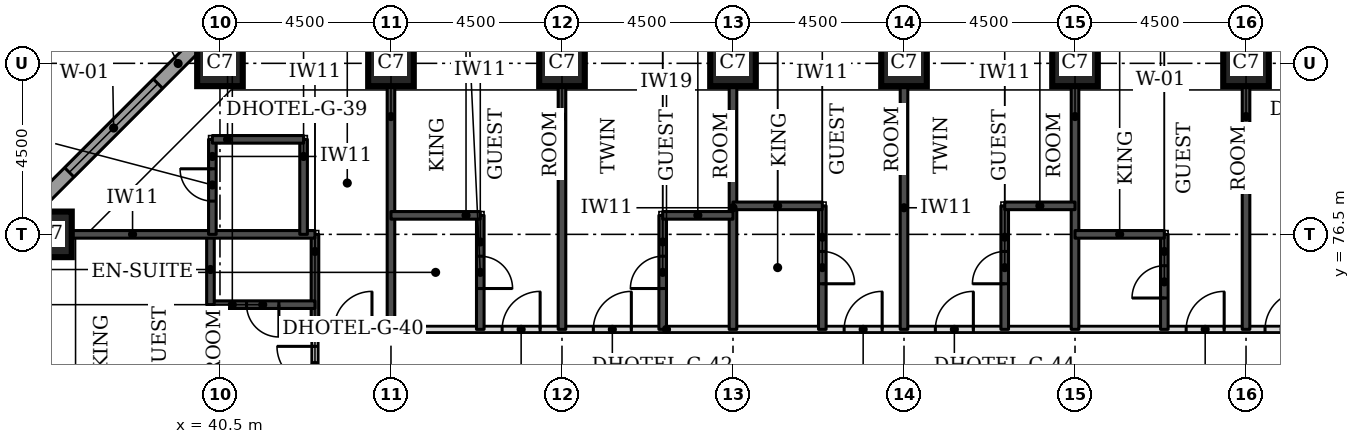
"""IFC4 building model, lengths in metres.
Left out: names, types, materials, properties, quantities, classifications, styles, units other than length and angle.
Written with IfcOpenShell. Run it as: python <this file> out.ifc"""

import sys

from ifc_helpers import new_model, si_unit, direction, frame, frame_2d, origin, origin_2d, place, context, subcontext, project, spatial, rectangle, extrude, element, fill, save


model = new_model("IFC4")
c1 = context("Model", 3, precision=1e-05, world=origin(), true_north=direction((0.0, 1.0)))
c2 = subcontext(c1, "Body", "Model", "MODEL_VIEW")
j1 = project(units=[si_unit("LENGTHUNIT", "METRE"), si_unit("PLANEANGLEUNIT", "RADIAN")], contexts=[c1])
p1 = place(None, origin())
s1 = spatial("IfcSite", under=j1, at=p1, CompositionType="ELEMENT")
p2 = place(p1, origin())
s2 = spatial("IfcBuilding", under=s1, at=p2, CompositionType="ELEMENT")
p3 = place(p2, frame((0.0, 0.0, 66.0)))
s3 = spatial("IfcBuildingStorey", under=s2, at=p3, CompositionType="ELEMENT", Elevation=66.0)
for number, where, z_axis, x_axis in (
    (1, (36.0, 76.5, 0.0), (0.0, 0.0, 1.0), (1.0, 0.0, 0.0)),
    (2, (40.5, 81.0, 0.0), (0.0, 0.0, 1.0), (1.0, 0.0, 0.0)),
    (3, (45.0, 81.0, 0.0), (0.0, 0.0, 1.0), (1.0, 0.0, 0.0)),
    (4, (49.5, 81.0, 0.0), (0.0, 0.0, 1.0), (1.0, 0.0, 0.0)),
    (5, (54.0, 81.0, 0.0), (0.0, 0.0, 1.0), (1.0, 0.0, 0.0)),
    (6, (58.5, 81.0, 0.0), (0.0, 0.0, 1.0), (1.0, 0.0, 0.0)),
    (7, (63.0, 81.0, 0.0), (0.0, 0.0, 1.0), (1.0, 0.0, 0.0)),
    (8, (67.5, 81.0, 0.0), (0.0, 0.0, 1.0), (1.0, 0.0, 0.0)),
):
    element("IfcColumn", number, at=place(p3, frame(where, z_axis=z_axis, x_axis=x_axis)), inside=s3, PredefinedType="COLUMN", context=c2, shape_type="SweptSolid", body=[
        extrude(rectangle(XDim=1.2, YDim=1.2, at=origin_2d()), origin(), (0.0, 0.0, 1.0), 3.3),
    ])
p4 = place(p3, frame((40.23, 81.826, 0.0), z_axis=(0.0, 0.0, 1.0), x_axis=(-0.707106781187, -0.707106781187, 0.0)))
e9 = element("IfcWall", 9, at=p4, inside=s3, PredefinedType="STANDARD", context=c2, shape_type="SweptSolid", body=[
    extrude(rectangle(XDim=7.151, YDim=0.35, at=frame_2d((3.576, 0.0))), origin(), (0.0, 0.0, 1.0), 3.055),
])
p5 = place(p4, frame((1.926, 0.0, 0.8)))
e10 = element("IfcOpeningElement", 10, at=p5, cuts=e9, PredefinedType="OPENING", context=c2, shape_type="SweptSolid", body=[
    extrude(rectangle(XDim=3.3, YDim=1.5, at=frame_2d((1.65, 0.75))), frame((0.0, 0.185, 0.0), z_axis=(0.0, -1.0, 0.0), x_axis=(1.0, 0.0, 0.0)), (0.0, 0.0, 1.0), 0.37),
])
p6 = place(p3, frame((43.0, 56.6, 0.0), z_axis=(0.0, 0.0, 1.0), x_axis=(0.0, 1.0, 0.0)))
e11 = element("IfcWall", 11, at=p6, inside=s3, PredefinedType="PARTITIONING", context=c2, shape_type="SweptSolid", body=[
    extrude(rectangle(XDim=17.4, YDim=0.15, at=frame_2d((8.7, 0.0))), origin(), (0.0, 0.0, 1.0), 3.08),
])
p7 = place(p6, frame((9.075, 0.0, 0.0)))
e12 = element("IfcOpeningElement", 12, at=p7, cuts=e11, PredefinedType="OPENING", context=c2, shape_type="SweptSolid", body=[
    extrude(rectangle(XDim=1.0, YDim=2.1, at=frame_2d((0.5, 1.05))), frame((0.0, 0.085, 0.0), z_axis=(0.0, -1.0, 0.0), x_axis=(1.0, 0.0, 0.0)), (0.0, 0.0, 1.0), 0.17),
])
p8 = place(p6, frame((11.475, 0.0, 0.0)))
e13 = element("IfcOpeningElement", 13, at=p8, cuts=e11, PredefinedType="OPENING", context=c2, shape_type="SweptSolid", body=[
    extrude(rectangle(XDim=1.0, YDim=2.1, at=frame_2d((0.5, 1.05))), frame((0.0, 0.085, 0.0), z_axis=(0.0, -1.0, 0.0), x_axis=(1.0, 0.0, 0.0)), (0.0, 0.0, 1.0), 0.17),
])
p9 = place(p6, frame((15.953, 0.0, 0.0)))
e14 = element("IfcOpeningElement", 14, at=p9, cuts=e11, PredefinedType="OPENING", context=c2, shape_type="SweptSolid", body=[
    extrude(rectangle(XDim=1.0, YDim=2.1, at=frame_2d((0.5, 1.05))), frame((0.0, 0.085, 0.0), z_axis=(0.0, -1.0, 0.0), x_axis=(1.0, 0.0, 0.0)), (0.0, 0.0, 1.0), 0.17),
])
p10 = place(p3, frame((43.0, 74.0, 0.0), z_axis=(0.0, 0.0, 1.0), x_axis=(1.0, 0.0, 0.0)))
e15 = element("IfcWall", 15, at=p10, inside=s3, PredefinedType="PARTITIONING", context=c2, shape_type="SweptSolid", body=[
    extrude(rectangle(XDim=26.5, YDim=0.15, at=frame_2d((13.25, 0.0))), origin(), (0.0, 0.0, 1.0), 3.08),
])
p11 = place(p10, frame((4.925, 0.0, 0.0)))
e16 = element("IfcOpeningElement", 16, at=p11, cuts=e15, PredefinedType="OPENING", context=c2, shape_type="SweptSolid", body=[
    extrude(rectangle(XDim=1.0, YDim=2.1, at=frame_2d((0.5, 1.05))), frame((0.0, 0.085, 0.0), z_axis=(0.0, -1.0, 0.0), x_axis=(1.0, 0.0, 0.0)), (0.0, 0.0, 1.0), 0.17),
])
p12 = place(p10, frame((7.325, 0.0, 0.0)))
e17 = element("IfcOpeningElement", 17, at=p12, cuts=e15, PredefinedType="OPENING", context=c2, shape_type="SweptSolid", body=[
    extrude(rectangle(XDim=1.0, YDim=2.1, at=frame_2d((0.5, 1.05))), frame((0.0, 0.085, 0.0), z_axis=(0.0, -1.0, 0.0), x_axis=(1.0, 0.0, 0.0)), (0.0, 0.0, 1.0), 0.17),
])
p13 = place(p10, frame((13.925, 0.0, 0.0)))
e18 = element("IfcOpeningElement", 18, at=p13, cuts=e15, PredefinedType="OPENING", context=c2, shape_type="SweptSolid", body=[
    extrude(rectangle(XDim=1.0, YDim=2.1, at=frame_2d((0.5, 1.05))), frame((0.0, 0.085, 0.0), z_axis=(0.0, -1.0, 0.0), x_axis=(1.0, 0.0, 0.0)), (0.0, 0.0, 1.0), 0.17),
])
p14 = place(p10, frame((16.325, 0.0, 0.0)))
e19 = element("IfcOpeningElement", 19, at=p14, cuts=e15, PredefinedType="OPENING", context=c2, shape_type="SweptSolid", body=[
    extrude(rectangle(XDim=1.0, YDim=2.1, at=frame_2d((0.5, 1.05))), frame((0.0, 0.085, 0.0), z_axis=(0.0, -1.0, 0.0), x_axis=(1.0, 0.0, 0.0)), (0.0, 0.0, 1.0), 0.17),
])
p15 = place(p10, frame((22.925, 0.0, 0.0)))
e20 = element("IfcOpeningElement", 20, at=p15, cuts=e15, PredefinedType="OPENING", context=c2, shape_type="SweptSolid", body=[
    extrude(rectangle(XDim=1.0, YDim=2.1, at=frame_2d((0.5, 1.05))), frame((0.0, 0.085, 0.0), z_axis=(0.0, -1.0, 0.0), x_axis=(1.0, 0.0, 0.0)), (0.0, 0.0, 1.0), 0.17),
])
p16 = place(p10, frame((0.5, 0.0, 0.0)))
e21 = element("IfcOpeningElement", 21, at=p16, cuts=e15, PredefinedType="OPENING", context=c2, shape_type="SweptSolid", body=[
    extrude(rectangle(XDim=1.0, YDim=2.1, at=frame_2d((0.5, 1.05))), frame((0.0, 0.085, 0.0), z_axis=(0.0, -1.0, 0.0), x_axis=(1.0, 0.0, 0.0)), (0.0, 0.0, 1.0), 0.17),
])
p17 = place(p10, frame((25.0, 0.0, 0.0)))
e22 = element("IfcOpeningElement", 22, at=p17, cuts=e15, PredefinedType="OPENING", context=c2, shape_type="SweptSolid", body=[
    extrude(rectangle(XDim=1.0, YDim=2.1, at=frame_2d((0.5, 1.05))), frame((0.0, 0.085, 0.0), z_axis=(0.0, -1.0, 0.0), x_axis=(1.0, 0.0, 0.0)), (0.0, 0.0, 1.0), 0.17),
])
p18 = place(p3, frame((43.0, 74.0, 0.0), z_axis=(0.0, 0.0, 1.0), x_axis=(0.0, 1.0, 0.0)))
e23 = element("IfcWall", 23, at=p18, inside=s3, PredefinedType="SOLIDWALL", context=c2, shape_type="SweptSolid", body=[
    extrude(rectangle(XDim=2.5, YDim=0.2, at=frame_2d((1.25, 0.0))), origin(), (0.0, 0.0, 1.0), 3.08),
])
p19 = place(p3, frame((45.0, 74.0, 0.0), z_axis=(0.0, 0.0, 1.0), x_axis=(0.0, 1.0, 0.0)))
e24 = element("IfcWall", 24, at=p19, inside=s3, PredefinedType="SOLIDWALL", context=c2, shape_type="SweptSolid", body=[
    extrude(rectangle(XDim=6.4, YDim=0.2, at=frame_2d((3.2, 0.0))), origin(), (0.0, 0.0, 1.0), 3.08),
])
p20 = place(p3, frame((47.35, 74.0, 0.0), z_axis=(0.0, 0.0, 1.0), x_axis=(0.0, 1.0, 0.0)))
e25 = element("IfcWall", 25, at=p20, inside=s3, PredefinedType="SOLIDWALL", context=c2, shape_type="SweptSolid", body=[
    extrude(rectangle(XDim=3.0, YDim=0.2, at=frame_2d((1.5, 0.0))), origin(), (0.0, 0.0, 1.0), 3.08),
])
p21 = place(p20, frame((1.075, 0.0, 0.0)))
e26 = element("IfcOpeningElement", 26, at=p21, cuts=e25, PredefinedType="OPENING", context=c2, shape_type="SweptSolid", body=[
    extrude(rectangle(XDim=0.85, YDim=2.1, at=frame_2d((0.425, 1.05))), frame((0.0, 0.11, 0.0), z_axis=(0.0, -1.0, 0.0), x_axis=(1.0, 0.0, 0.0)), (0.0, 0.0, 1.0), 0.22),
])
p22 = place(p3, frame((49.5, 74.0, 0.0), z_axis=(0.0, 0.0, 1.0), x_axis=(0.0, 1.0, 0.0)))
e27 = element("IfcWall", 27, at=p22, inside=s3, PredefinedType="SOLIDWALL", context=c2, shape_type="SweptSolid", body=[
    extrude(rectangle(XDim=6.4, YDim=0.2, at=frame_2d((3.2, 0.0))), origin(), (0.0, 0.0, 1.0), 3.08),
])
p23 = place(p3, frame((52.15, 74.0, 0.0), z_axis=(0.0, 0.0, 1.0), x_axis=(0.0, 1.0, 0.0)))
e28 = element("IfcWall", 28, at=p23, inside=s3, PredefinedType="SOLIDWALL", context=c2, shape_type="SweptSolid", body=[
    extrude(rectangle(XDim=3.0, YDim=0.2, at=frame_2d((1.5, 0.0))), origin(), (0.0, 0.0, 1.0), 3.08),
])
p24 = place(p23, frame((1.075, 0.0, 0.0)))
e29 = element("IfcOpeningElement", 29, at=p24, cuts=e28, PredefinedType="OPENING", context=c2, shape_type="SweptSolid", body=[
    extrude(rectangle(XDim=0.85, YDim=2.1, at=frame_2d((0.425, 1.05))), frame((0.0, 0.11, 0.0), z_axis=(0.0, -1.0, 0.0), x_axis=(1.0, 0.0, 0.0)), (0.0, 0.0, 1.0), 0.22),
])
p25 = place(p3, frame((54.0, 74.0, 0.0), z_axis=(0.0, 0.0, 1.0), x_axis=(0.0, 1.0, 0.0)))
e30 = element("IfcWall", 30, at=p25, inside=s3, PredefinedType="SOLIDWALL", context=c2, shape_type="SweptSolid", body=[
    extrude(rectangle(XDim=6.4, YDim=0.2, at=frame_2d((3.2, 0.0))), origin(), (0.0, 0.0, 1.0), 3.08),
])
p26 = place(p3, frame((56.35, 74.0, 0.0), z_axis=(0.0, 0.0, 1.0), x_axis=(0.0, 1.0, 0.0)))
e31 = element("IfcWall", 31, at=p26, inside=s3, PredefinedType="SOLIDWALL", context=c2, shape_type="SweptSolid", body=[
    extrude(rectangle(XDim=3.25, YDim=0.2, at=frame_2d((1.625, 0.0))), origin(), (0.0, 0.0, 1.0), 3.08),
])
p27 = place(p26, frame((1.2, 0.0, 0.0)))
e32 = element("IfcOpeningElement", 32, at=p27, cuts=e31, PredefinedType="OPENING", context=c2, shape_type="SweptSolid", body=[
    extrude(rectangle(XDim=0.85, YDim=2.1, at=frame_2d((0.425, 1.05))), frame((0.0, 0.11, 0.0), z_axis=(0.0, -1.0, 0.0), x_axis=(1.0, 0.0, 0.0)), (0.0, 0.0, 1.0), 0.22),
])
p28 = place(p3, frame((58.5, 74.0, 0.0), z_axis=(0.0, 0.0, 1.0), x_axis=(0.0, 1.0, 0.0)))
e33 = element("IfcWall", 33, at=p28, inside=s3, PredefinedType="SOLIDWALL", context=c2, shape_type="SweptSolid", body=[
    extrude(rectangle(XDim=6.4, YDim=0.2, at=frame_2d((3.2, 0.0))), origin(), (0.0, 0.0, 1.0), 3.08),
])
p29 = place(p3, frame((61.15, 74.0, 0.0), z_axis=(0.0, 0.0, 1.0), x_axis=(0.0, 1.0, 0.0)))
e34 = element("IfcWall", 34, at=p29, inside=s3, PredefinedType="SOLIDWALL", context=c2, shape_type="SweptSolid", body=[
    extrude(rectangle(XDim=3.25, YDim=0.2, at=frame_2d((1.625, 0.0))), origin(), (0.0, 0.0, 1.0), 3.08),
])
p30 = place(p29, frame((1.2, 0.0, 0.0)))
e35 = element("IfcOpeningElement", 35, at=p30, cuts=e34, PredefinedType="OPENING", context=c2, shape_type="SweptSolid", body=[
    extrude(rectangle(XDim=0.85, YDim=2.1, at=frame_2d((0.425, 1.05))), frame((0.0, 0.11, 0.0), z_axis=(0.0, -1.0, 0.0), x_axis=(1.0, 0.0, 0.0)), (0.0, 0.0, 1.0), 0.22),
])
p31 = place(p3, frame((63.0, 74.0, 0.0), z_axis=(0.0, 0.0, 1.0), x_axis=(0.0, 1.0, 0.0)))
e36 = element("IfcWall", 36, at=p31, inside=s3, PredefinedType="SOLIDWALL", context=c2, shape_type="SweptSolid", body=[
    extrude(rectangle(XDim=6.4, YDim=0.2, at=frame_2d((3.2, 0.0))), origin(), (0.0, 0.0, 1.0), 3.08),
])
p32 = place(p3, frame((65.35, 74.0, 0.0), z_axis=(0.0, 0.0, 1.0), x_axis=(0.0, 1.0, 0.0)))
e37 = element("IfcWall", 37, at=p32, inside=s3, PredefinedType="SOLIDWALL", context=c2, shape_type="SweptSolid", body=[
    extrude(rectangle(XDim=2.5, YDim=0.2, at=frame_2d((1.25, 0.0))), origin(), (0.0, 0.0, 1.0), 3.08),
])
p33 = place(p32, frame((0.825, 0.0, 0.0)))
e38 = element("IfcOpeningElement", 38, at=p33, cuts=e37, PredefinedType="OPENING", context=c2, shape_type="SweptSolid", body=[
    extrude(rectangle(XDim=0.85, YDim=2.1, at=frame_2d((0.425, 1.05))), frame((0.0, 0.11, 0.0), z_axis=(0.0, -1.0, 0.0), x_axis=(1.0, 0.0, 0.0)), (0.0, 0.0, 1.0), 0.22),
])
p34 = place(p3, frame((67.5, 74.0, 0.0), z_axis=(0.0, 0.0, 1.0), x_axis=(0.0, 1.0, 0.0)))
e39 = element("IfcWall", 39, at=p34, inside=s3, PredefinedType="SOLIDWALL", context=c2, shape_type="SweptSolid", body=[
    extrude(rectangle(XDim=6.4, YDim=0.2, at=frame_2d((3.2, 0.0))), origin(), (0.0, 0.0, 1.0), 3.08),
])
p35 = place(p3, frame((40.25, 74.65, 0.0), z_axis=(0.0, 0.0, 1.0), x_axis=(1.0, 0.0, 0.0)))
e40 = element("IfcWall", 40, at=p35, inside=s3, PredefinedType="SOLIDWALL", context=c2, shape_type="SweptSolid", body=[
    extrude(rectangle(XDim=2.75, YDim=0.2, at=frame_2d((1.375, 0.0))), origin(), (0.0, 0.0, 1.0), 3.08),
])
p36 = place(p35, frame((0.95, 0.0, 0.0)))
e41 = element("IfcOpeningElement", 41, at=p36, cuts=e40, PredefinedType="OPENING", context=c2, shape_type="SweptSolid", body=[
    extrude(rectangle(XDim=0.85, YDim=2.1, at=frame_2d((0.425, 1.05))), frame((0.0, 0.11, 0.0), z_axis=(0.0, -1.0, 0.0), x_axis=(1.0, 0.0, 0.0)), (0.0, 0.0, 1.0), 0.22),
])
p37 = place(p3, frame((40.25, 74.65, 0.0), z_axis=(0.0, 0.0, 1.0), x_axis=(0.0, 1.0, 0.0)))
e42 = element("IfcWall", 42, at=p37, inside=s3, PredefinedType="SOLIDWALL", context=c2, shape_type="SweptSolid", body=[
    extrude(rectangle(XDim=1.85, YDim=0.2, at=frame_2d((0.925, 0.0))), origin(), (0.0, 0.0, 1.0), 3.08),
])
p38 = place(p3, frame((36.6, 76.5, 0.0), z_axis=(0.0, 0.0, 1.0), x_axis=(1.0, 0.0, 0.0)))
e43 = element("IfcWall", 43, at=p38, inside=s3, PredefinedType="SOLIDWALL", context=c2, shape_type="SweptSolid", body=[
    extrude(rectangle(XDim=6.4, YDim=0.2, at=frame_2d((3.2, 0.0))), origin(), (0.0, 0.0, 1.0), 3.08),
])
p39 = place(p3, frame((40.3, 76.5, 0.0), z_axis=(0.0, 0.0, 1.0), x_axis=(0.0, 1.0, 0.0)))
e44 = element("IfcWall", 44, at=p39, inside=s3, PredefinedType="SOLIDWALL", context=c2, shape_type="SweptSolid", body=[
    extrude(rectangle(XDim=2.5, YDim=0.2, at=frame_2d((1.25, 0.0))), origin(), (0.0, 0.0, 1.0), 3.08),
])
p40 = place(p39, frame((0.875, 0.0, 0.0)))
e45 = element("IfcOpeningElement", 45, at=p40, cuts=e44, PredefinedType="OPENING", context=c2, shape_type="SweptSolid", body=[
    extrude(rectangle(XDim=0.85, YDim=2.1, at=frame_2d((0.425, 1.05))), frame((0.0, 0.11, 0.0), z_axis=(0.0, -1.0, 0.0), x_axis=(1.0, 0.0, 0.0)), (0.0, 0.0, 1.0), 0.22),
])
p41 = place(p3, frame((42.7, 76.5, 0.0), z_axis=(0.0, 0.0, 1.0), x_axis=(0.0, 1.0, 0.0)))
e46 = element("IfcWall", 46, at=p41, inside=s3, PredefinedType="SOLIDWALL", context=c2, shape_type="SweptSolid", body=[
    extrude(rectangle(XDim=2.5, YDim=0.2, at=frame_2d((1.25, 0.0))), origin(), (0.0, 0.0, 1.0), 3.08),
])
for number, where, z_axis, x_axis in (
    (47, (63.0, 76.5, 0.0), (0.0, 0.0, 1.0), (1.0, 0.0, 0.0)),
    (48, (45.0, 77.0, 0.0), (0.0, 0.0, 1.0), (1.0, 0.0, 0.0)),
):
    element("IfcWall", number, at=place(p3, frame(where, z_axis=z_axis, x_axis=x_axis)), inside=s3, PredefinedType="SOLIDWALL", context=c2, shape_type="SweptSolid", body=[
        extrude(rectangle(XDim=2.35, YDim=0.2, at=frame_2d((1.175, 0.0))), origin(), (0.0, 0.0, 1.0), 3.08),
    ])
p42 = place(p3, frame((52.15, 77.0, 0.0), z_axis=(0.0, 0.0, 1.0), x_axis=(1.0, 0.0, 0.0)))
e49 = element("IfcWall", 49, at=p42, inside=s3, PredefinedType="SOLIDWALL", context=c2, shape_type="SweptSolid", body=[
    extrude(rectangle(XDim=1.85, YDim=0.2, at=frame_2d((0.925, 0.0))), origin(), (0.0, 0.0, 1.0), 3.08),
])
p43 = place(p3, frame((54.0, 77.25, 0.0), z_axis=(0.0, 0.0, 1.0), x_axis=(1.0, 0.0, 0.0)))
e50 = element("IfcWall", 50, at=p43, inside=s3, PredefinedType="SOLIDWALL", context=c2, shape_type="SweptSolid", body=[
    extrude(rectangle(XDim=2.35, YDim=0.2, at=frame_2d((1.175, 0.0))), origin(), (0.0, 0.0, 1.0), 3.08),
])
p44 = place(p3, frame((61.15, 77.25, 0.0), z_axis=(0.0, 0.0, 1.0), x_axis=(1.0, 0.0, 0.0)))
e51 = element("IfcWall", 51, at=p44, inside=s3, PredefinedType="SOLIDWALL", context=c2, shape_type="SweptSolid", body=[
    extrude(rectangle(XDim=1.85, YDim=0.2, at=frame_2d((0.925, 0.0))), origin(), (0.0, 0.0, 1.0), 3.08),
])
p45 = place(p3, frame((40.3, 79.0, 0.0), z_axis=(0.0, 0.0, 1.0), x_axis=(1.0, 0.0, 0.0)))
e52 = element("IfcWall", 52, at=p45, inside=s3, PredefinedType="SOLIDWALL", context=c2, shape_type="SweptSolid", body=[
    extrude(rectangle(XDim=2.4, YDim=0.2, at=frame_2d((1.2, 0.0))), origin(), (0.0, 0.0, 1.0), 3.08),
])
p46 = place(p5, origin())
e53 = element("IfcWindow", 53, at=p46, inside=s3, PartitioningType="SINGLE_PANEL", PredefinedType="WINDOW", context=c2, shape_type="SweptSolid", body=[
    extrude(rectangle(XDim=3.3, YDim=1.5, at=frame_2d((1.65, 0.75))), frame((0.0, 0.085, 0.0), z_axis=(0.0, -1.0, 0.0), x_axis=(1.0, 0.0, 0.0)), (0.0, 0.0, 1.0), 0.06),
])
fill(e10, e53)
p47 = place(p9, origin())
e54 = element("IfcDoor", 54, at=p47, inside=s3, OperationType="SINGLE_SWING_RIGHT", PredefinedType="DOOR", context=c2, shape_type="SweptSolid", body=[
    extrude(rectangle(XDim=1.0, YDim=2.1, at=frame_2d((0.5, 1.05))), frame((0.0, 0.025, 0.0), z_axis=(0.0, -1.0, 0.0), x_axis=(1.0, 0.0, 0.0)), (0.0, 0.0, 1.0), 0.05),
])
fill(e14, e54)
p48 = place(p36, frame((0.85, 0.0, 0.0), z_axis=(0.0, 0.0, 1.0), x_axis=(-1.0, 0.0, 0.0)))
e55 = element("IfcDoor", 55, at=p48, inside=s3, OperationType="SINGLE_SWING_LEFT", PredefinedType="DOOR", context=c2, shape_type="SweptSolid", body=[
    extrude(rectangle(XDim=0.85, YDim=2.1, at=frame_2d((0.425, 1.05))), frame((0.0, 0.025, 0.0), z_axis=(0.0, -1.0, 0.0), x_axis=(1.0, 0.0, 0.0)), (0.0, 0.0, 1.0), 0.05),
])
fill(e41, e55)
p49 = place(p11, origin())
e56 = element("IfcDoor", 56, at=p49, inside=s3, OperationType="SINGLE_SWING_RIGHT", PredefinedType="DOOR", context=c2, shape_type="SweptSolid", body=[
    extrude(rectangle(XDim=1.0, YDim=2.1, at=frame_2d((0.5, 1.05))), frame((0.0, 0.025, 0.0), z_axis=(0.0, -1.0, 0.0), x_axis=(1.0, 0.0, 0.0)), (0.0, 0.0, 1.0), 0.05),
])
fill(e16, e56)
p50 = place(p21, frame((0.85, 0.0, 0.0), z_axis=(0.0, 0.0, 1.0), x_axis=(-1.0, 0.0, 0.0)))
e57 = element("IfcDoor", 57, at=p50, inside=s3, OperationType="SINGLE_SWING_RIGHT", PredefinedType="DOOR", context=c2, shape_type="SweptSolid", body=[
    extrude(rectangle(XDim=0.85, YDim=2.1, at=frame_2d((0.425, 1.05))), frame((0.0, 0.025, 0.0), z_axis=(0.0, -1.0, 0.0), x_axis=(1.0, 0.0, 0.0)), (0.0, 0.0, 1.0), 0.05),
])
fill(e26, e57)
p51 = place(p12, origin())
e58 = element("IfcDoor", 58, at=p51, inside=s3, OperationType="SINGLE_SWING_RIGHT", PredefinedType="DOOR", context=c2, shape_type="SweptSolid", body=[
    extrude(rectangle(XDim=1.0, YDim=2.1, at=frame_2d((0.5, 1.05))), frame((0.0, 0.025, 0.0), z_axis=(0.0, -1.0, 0.0), x_axis=(1.0, 0.0, 0.0)), (0.0, 0.0, 1.0), 0.05),
])
fill(e17, e58)
p52 = place(p24, origin())
e59 = element("IfcDoor", 59, at=p52, inside=s3, OperationType="SINGLE_SWING_LEFT", PredefinedType="DOOR", context=c2, shape_type="SweptSolid", body=[
    extrude(rectangle(XDim=0.85, YDim=2.1, at=frame_2d((0.425, 1.05))), frame((0.0, 0.025, 0.0), z_axis=(0.0, -1.0, 0.0), x_axis=(1.0, 0.0, 0.0)), (0.0, 0.0, 1.0), 0.05),
])
fill(e29, e59)
p53 = place(p13, origin())
e60 = element("IfcDoor", 60, at=p53, inside=s3, OperationType="SINGLE_SWING_RIGHT", PredefinedType="DOOR", context=c2, shape_type="SweptSolid", body=[
    extrude(rectangle(XDim=1.0, YDim=2.1, at=frame_2d((0.5, 1.05))), frame((0.0, 0.025, 0.0), z_axis=(0.0, -1.0, 0.0), x_axis=(1.0, 0.0, 0.0)), (0.0, 0.0, 1.0), 0.05),
])
fill(e18, e60)
p54 = place(p27, frame((0.85, 0.0, 0.0), z_axis=(0.0, 0.0, 1.0), x_axis=(-1.0, 0.0, 0.0)))
e61 = element("IfcDoor", 61, at=p54, inside=s3, OperationType="SINGLE_SWING_RIGHT", PredefinedType="DOOR", context=c2, shape_type="SweptSolid", body=[
    extrude(rectangle(XDim=0.85, YDim=2.1, at=frame_2d((0.425, 1.05))), frame((0.0, 0.025, 0.0), z_axis=(0.0, -1.0, 0.0), x_axis=(1.0, 0.0, 0.0)), (0.0, 0.0, 1.0), 0.05),
])
fill(e32, e61)
p55 = place(p14, origin())
e62 = element("IfcDoor", 62, at=p55, inside=s3, OperationType="SINGLE_SWING_RIGHT", PredefinedType="DOOR", context=c2, shape_type="SweptSolid", body=[
    extrude(rectangle(XDim=1.0, YDim=2.1, at=frame_2d((0.5, 1.05))), frame((0.0, 0.025, 0.0), z_axis=(0.0, -1.0, 0.0), x_axis=(1.0, 0.0, 0.0)), (0.0, 0.0, 1.0), 0.05),
])
fill(e19, e62)
p56 = place(p30, origin())
e63 = element("IfcDoor", 63, at=p56, inside=s3, OperationType="SINGLE_SWING_LEFT", PredefinedType="DOOR", context=c2, shape_type="SweptSolid", body=[
    extrude(rectangle(XDim=0.85, YDim=2.1, at=frame_2d((0.425, 1.05))), frame((0.0, 0.025, 0.0), z_axis=(0.0, -1.0, 0.0), x_axis=(1.0, 0.0, 0.0)), (0.0, 0.0, 1.0), 0.05),
])
fill(e35, e63)
p57 = place(p15, origin())
e64 = element("IfcDoor", 64, at=p57, inside=s3, OperationType="SINGLE_SWING_RIGHT", PredefinedType="DOOR", context=c2, shape_type="SweptSolid", body=[
    extrude(rectangle(XDim=1.0, YDim=2.1, at=frame_2d((0.5, 1.05))), frame((0.0, 0.025, 0.0), z_axis=(0.0, -1.0, 0.0), x_axis=(1.0, 0.0, 0.0)), (0.0, 0.0, 1.0), 0.05),
])
fill(e20, e64)
p58 = place(p33, origin())
e65 = element("IfcDoor", 65, at=p58, inside=s3, OperationType="SINGLE_SWING_LEFT", PredefinedType="DOOR", context=c2, shape_type="SweptSolid", body=[
    extrude(rectangle(XDim=0.85, YDim=2.1, at=frame_2d((0.425, 1.05))), frame((0.0, 0.025, 0.0), z_axis=(0.0, -1.0, 0.0), x_axis=(1.0, 0.0, 0.0)), (0.0, 0.0, 1.0), 0.05),
])
fill(e38, e65)
p59 = place(p16, origin())
e66 = element("IfcDoor", 66, at=p59, inside=s3, OperationType="SINGLE_SWING_RIGHT", PredefinedType="DOOR", context=c2, shape_type="SweptSolid", body=[
    extrude(rectangle(XDim=1.0, YDim=2.1, at=frame_2d((0.5, 1.05))), frame((0.0, 0.025, 0.0), z_axis=(0.0, -1.0, 0.0), x_axis=(1.0, 0.0, 0.0)), (0.0, 0.0, 1.0), 0.05),
])
fill(e21, e66)
p60 = place(p40, origin())
e67 = element("IfcDoor", 67, at=p60, inside=s3, OperationType="SINGLE_SWING_RIGHT", PredefinedType="DOOR", context=c2, shape_type="SweptSolid", body=[
    extrude(rectangle(XDim=0.85, YDim=2.1, at=frame_2d((0.425, 1.05))), frame((0.0, 0.025, 0.0), z_axis=(0.0, -1.0, 0.0), x_axis=(1.0, 0.0, 0.0)), (0.0, 0.0, 1.0), 0.05),
])
fill(e45, e67)
p61 = place(p17, origin())
e68 = element("IfcDoor", 68, at=p61, inside=s3, OperationType="SINGLE_SWING_RIGHT", PredefinedType="DOOR", context=c2, shape_type="SweptSolid", body=[
    extrude(rectangle(XDim=1.0, YDim=2.1, at=frame_2d((0.5, 1.05))), frame((0.0, 0.025, 0.0), z_axis=(0.0, -1.0, 0.0), x_axis=(1.0, 0.0, 0.0)), (0.0, 0.0, 1.0), 0.05),
])
fill(e22, e68)
save(model, sys.argv[1])
